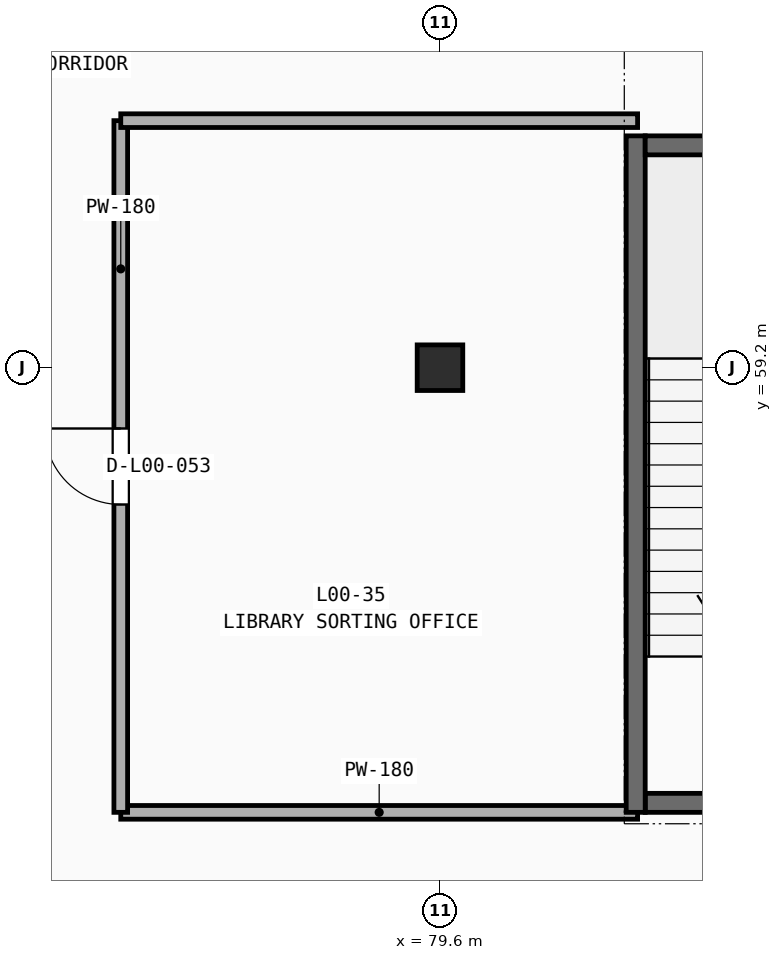
"""IFC4 building model, lengths in metres.
Left out: names, types, materials, properties, quantities, classifications, styles, units other than length and angle.
Written with IfcOpenShell. Run it as: python <this file> out.ifc"""

import sys

from ifc_helpers import new_model, si_unit, direction, frame, frame_2d, origin, origin_2d, place, context, subcontext, project, spatial, rectangle, extrude, element, fill, save


model = new_model("IFC4")
c1 = context("Model", 3, precision=1e-05, world=origin(), true_north=direction((0.0, 1.0)))
c2 = subcontext(c1, "Body", "Model", "MODEL_VIEW")
j1 = project(units=[si_unit("LENGTHUNIT", "METRE"), si_unit("PLANEANGLEUNIT", "RADIAN")], contexts=[c1])
p1 = place(None, origin())
s1 = spatial("IfcSite", under=j1, at=p1, CompositionType="ELEMENT")
p2 = place(p1, origin())
s2 = spatial("IfcBuilding", under=s1, at=p2, CompositionType="ELEMENT")
p3 = place(p2, origin())
s3 = spatial("IfcBuildingStorey", under=s2, at=p3, CompositionType="ELEMENT", Elevation=0.0)
p4 = place(p3, frame((79.6, 59.2, 0.0), z_axis=(0.0, 0.0, 1.0), x_axis=(1.0, 0.0, 0.0)))
e1 = element("IfcColumn", 1, at=p4, inside=s3, PredefinedType="COLUMN", context=c2, shape_type="SweptSolid", body=[
    extrude(rectangle(XDim=0.6, YDim=0.6, at=origin_2d()), origin(), (0.0, 0.0, 1.0), 5.4),
])
p5 = place(p3, frame((75.4, 53.35, 0.0), z_axis=(0.0, 0.0, 1.0), x_axis=(1.0, 0.0, 0.0)))
e2 = element("IfcWall", 2, at=p5, inside=s3, PredefinedType="PARTITIONING", context=c2, shape_type="SweptSolid", body=[
    extrude(rectangle(XDim=6.8, YDim=0.18, at=frame_2d((3.4, 0.0))), origin(), (0.0, 0.0, 1.0), 4.64),
])
p6 = place(p3, frame((75.4, 53.35, 0.0), z_axis=(0.0, 0.0, 1.0), x_axis=(0.0, 1.0, 0.0)))
e3 = element("IfcWall", 3, at=p6, inside=s3, PredefinedType="PARTITIONING", context=c2, shape_type="SweptSolid", body=[
    extrude(rectangle(XDim=9.1, YDim=0.18, at=frame_2d((4.55, 0.0))), origin(), (0.0, 0.0, 1.0), 4.54),
])
p7 = place(p6, frame((4.05, 0.0, -0.01)))
e4 = element("IfcOpeningElement", 4, at=p7, cuts=e3, PredefinedType="OPENING", context=c2, shape_type="SweptSolid", body=[
    extrude(rectangle(XDim=1.0, YDim=2.16, at=frame_2d((0.5, 1.08))), frame((0.0, 0.1, 0.0), z_axis=(0.0, -1.0, 0.0), x_axis=(1.0, 0.0, 0.0)), (0.0, 0.0, 1.0), 0.2),
])
p8 = place(p3, frame((75.4, 62.45, 0.0), z_axis=(0.0, 0.0, 1.0), x_axis=(1.0, 0.0, 0.0)))
e5 = element("IfcWall", 5, at=p8, inside=s3, PredefinedType="PARTITIONING", context=c2, shape_type="SweptSolid", body=[
    extrude(rectangle(XDim=6.8, YDim=0.18, at=frame_2d((3.4, 0.0))), origin(), (0.0, 0.0, 1.0), 4.64),
])
p9 = place(p3, frame((82.3, 53.475, 0.0), z_axis=(0.0, 0.0, 1.0), x_axis=(1.0, 0.0, 0.0)))
e6 = element("IfcWall", 6, at=p9, inside=s3, PredefinedType="SHEAR", context=c2, shape_type="SweptSolid", body=[
    extrude(rectangle(XDim=3.5, YDim=0.25, at=frame_2d((1.75, 0.0))), origin(), (0.0, 0.0, 1.0), 5.4),
])
p10 = place(p9, frame((1.1, 0.0, -0.01)))
e7 = element("IfcOpeningElement", 7, at=p10, cuts=e6, PredefinedType="OPENING", context=c2, shape_type="SweptSolid", body=[
    extrude(rectangle(XDim=1.3, YDim=2.16, at=frame_2d((0.65, 1.08))), frame((0.0, 0.135, 0.0), z_axis=(0.0, -1.0, 0.0), x_axis=(1.0, 0.0, 0.0)), (0.0, 0.0, 1.0), 0.27),
])
p11 = place(p3, frame((82.175, 53.35, 0.0), z_axis=(0.0, 0.0, 1.0), x_axis=(0.0, 1.0, 0.0)))
e8 = element("IfcWall", 8, at=p11, inside=s3, PredefinedType="SHEAR", context=c2, shape_type="SweptSolid", body=[
    extrude(rectangle(XDim=8.9, YDim=0.25, at=frame_2d((4.45, 0.0))), origin(), (0.0, 0.0, 1.0), 5.4),
])
p12 = place(p3, frame((85.8, 62.125, 0.0), z_axis=(0.0, 0.0, 1.0), x_axis=(-1.0, 0.0, 0.0)))
e9 = element("IfcWall", 9, at=p12, inside=s3, PredefinedType="SHEAR", context=c2, shape_type="SweptSolid", body=[
    extrude(rectangle(XDim=3.5, YDim=0.25, at=frame_2d((1.75, 0.0))), origin(), (0.0, 0.0, 1.0), 5.4),
])
p13 = place(p7, frame((0.0, 0.0, 0.01)))
e10 = element("IfcDoor", 10, at=p13, inside=s3, OperationType="SINGLE_SWING_RIGHT", PredefinedType="DOOR", context=c2, shape_type="SweptSolid", body=[
    extrude(rectangle(XDim=1.0, YDim=2.15, at=frame_2d((0.5, 1.075))), frame((0.0, 0.025, 0.0), z_axis=(0.0, -1.0, 0.0), x_axis=(1.0, 0.0, 0.0)), (0.0, 0.0, 1.0), 0.05),
])
fill(e4, e10)
save(model, sys.argv[1])
